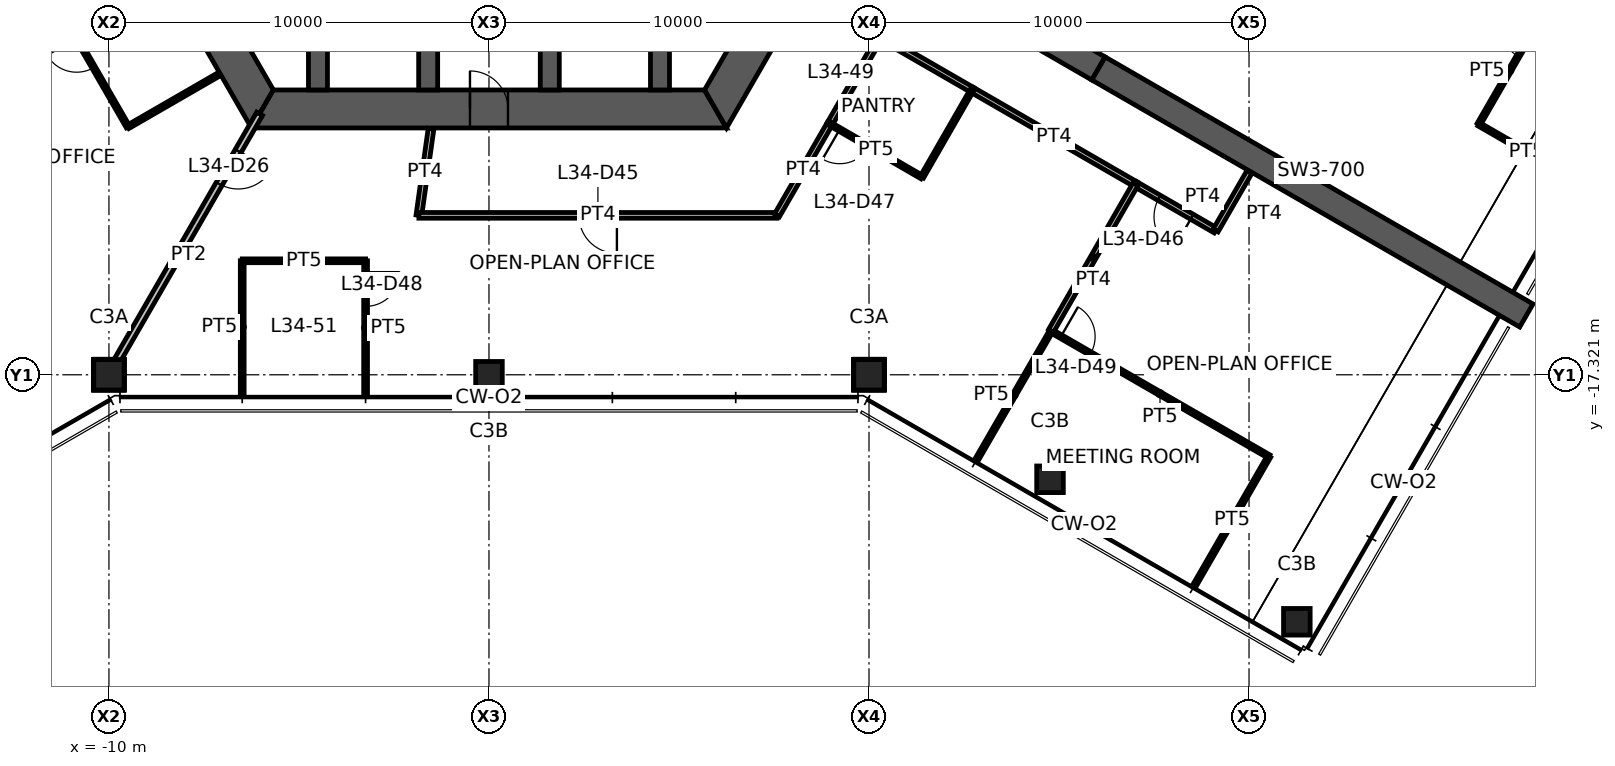
"""IFC4 building model, lengths in metres.
Left out: names, types, materials, properties, quantities, classifications, styles, units other than length and angle.
Written with IfcOpenShell. Run it as: python <this file> out.ifc"""

import sys

from ifc_helpers import new_model, si_unit, direction, frame, frame_2d, origin, origin_2d, place, context, subcontext, project, spatial, polyline, rectangle, hollow_rectangle, outline, extrude, element, fill, save


model = new_model("IFC4")
c1 = context("Model", 3, precision=1e-05, world=origin(), true_north=direction((0.0, 1.0)))
c2 = subcontext(c1, "Body", "Model", "MODEL_VIEW")
j1 = project(units=[si_unit("LENGTHUNIT", "METRE"), si_unit("PLANEANGLEUNIT", "RADIAN")], contexts=[c1])
p1 = place(None, origin())
s1 = spatial("IfcSite", under=j1, at=p1, CompositionType="ELEMENT")
p2 = place(p1, origin())
s2 = spatial("IfcBuilding", under=s1, at=p2, CompositionType="ELEMENT")
p3 = place(p2, frame((0.0, 0.0, 137.0)))
s3 = spatial("IfcBuildingStorey", under=s2, at=p3, CompositionType="ELEMENT", Elevation=137.0)
for number, where, z_axis, x_axis in (
    (1, (-10.0, -17.321, 0.0), (0.0, 0.0, 1.0), (1.0, 0.0, 0.0)),
    (2, (10.0, -17.321, 0.0), (0.0, 0.0, 1.0), (1.0, 0.0, 0.0)),
):
    element("IfcColumn", number, at=place(p3, frame(where, z_axis=z_axis, x_axis=x_axis)), inside=s3, PredefinedType="COLUMN", context=c2, shape_type="SweptSolid", body=[
        extrude(hollow_rectangle(XDim=0.8, YDim=0.8, WallThickness=0.045, at=origin_2d()), origin(), (0.0, 0.0, 1.0), 3.9),
    ])
for number, where, z_axis, x_axis in (
    (3, (0.0, -17.321, 0.0), (0.0, 0.0, 1.0), (1.0, 0.0, 0.0)),
    (4, (14.763, -20.071, 0.0), (0.0, 0.0, 1.0), (1.0, 0.0, 0.0)),
    (5, (21.258, -23.821, 0.0), (0.0, 0.0, 1.0), (1.0, 0.0, 0.0)),
):
    element("IfcColumn", number, at=place(p3, frame(where, z_axis=z_axis, x_axis=x_axis)), inside=s3, PredefinedType="COLUMN", context=c2, shape_type="SweptSolid", body=[
        extrude(hollow_rectangle(XDim=0.7, YDim=0.7, WallThickness=0.036, at=origin_2d()), origin(), (0.0, 0.0, 1.0), 3.9),
    ])
p4 = place(p3, frame((-11.922, 0.0, 0.0), z_axis=(0.0, 0.0, 1.0), x_axis=(0.500004296715, -0.866022923061, 0.0)))
e6 = element("IfcWall", 6, at=p4, inside=s3, PredefinedType="SHEAR", context=c2, shape_type="SweptSolid", body=[
    extrude(outline(polyline([(-0.289, -0.5), (6.331, -0.5), (7.131, -0.5), (12.211, -0.5), (11.634, 0.5), (7.131, 0.5), (6.331, 0.5), (0.289, 0.5), (-0.289, -0.5)])), origin(), (0.0, 0.0, 1.0), 3.9),
])
p5 = place(p4, frame((6.331, 0.0, 0.0)))
e7 = element("IfcOpeningElement", 7, at=p5, cuts=e6, PredefinedType="OPENING", context=c2, shape_type="SweptSolid", body=[
    extrude(rectangle(XDim=0.8, YDim=2.1, at=frame_2d((0.4, 1.05))), frame((0.0, 0.51, 0.0), z_axis=(0.0, -1.0, 0.0), x_axis=(1.0, 0.0, 0.0)), (0.0, 0.0, 1.0), 1.02),
])
p6 = place(p3, frame((-5.961, -10.325, 0.0), z_axis=(0.0, 0.0, 1.0), x_axis=(1.0, 0.0, 0.0)))
e8 = element("IfcWall", 8, at=p6, inside=s3, PredefinedType="SHEAR", context=c2, shape_type="SweptSolid", body=[
    extrude(outline(polyline([(-0.289, -0.5), (5.461, -0.5), (6.461, -0.5), (12.211, -0.5), (11.634, 0.5), (6.461, 0.5), (5.461, 0.5), (0.289, 0.5), (-0.289, -0.5)])), origin(), (0.0, 0.0, 1.0), 3.9),
])
p7 = place(p6, frame((5.461, 0.0, 0.0)))
e9 = element("IfcOpeningElement", 9, at=p7, cuts=e8, PredefinedType="OPENING", context=c2, shape_type="SweptSolid", body=[
    extrude(rectangle(XDim=1.0, YDim=2.1, at=frame_2d((0.5, 1.05))), frame((0.0, 0.51, 0.0), z_axis=(0.0, -1.0, 0.0), x_axis=(1.0, 0.0, 0.0)), (0.0, 0.0, 1.0), 1.02),
])
p8 = place(p3, frame((5.961, -10.325, 0.0), z_axis=(0.0, 0.0, 1.0), x_axis=(0.500004296715, 0.866022923061, 0.0)))
e10 = element("IfcWall", 10, at=p8, inside=s3, PredefinedType="SHEAR", context=c2, shape_type="SweptSolid", body=[
    extrude(outline(polyline([(-0.289, -0.5), (4.594, -0.5), (5.394, -0.5), (12.211, -0.5), (11.634, 0.5), (5.394, 0.5), (4.594, 0.5), (0.289, 0.5), (-0.289, -0.5)])), origin(), (0.0, 0.0, 1.0), 3.9),
])
p9 = place(p8, frame((4.594, 0.0, 0.0)))
e11 = element("IfcOpeningElement", 11, at=p9, cuts=e10, PredefinedType="OPENING", context=c2, shape_type="SweptSolid", body=[
    extrude(rectangle(XDim=0.8, YDim=2.1, at=frame_2d((0.4, 1.05))), frame((0.0, 0.51, 0.0), z_axis=(0.0, -1.0, 0.0), x_axis=(1.0, 0.0, 0.0)), (0.0, 0.0, 1.0), 1.02),
])
p10 = place(p3, frame((-9.375, -5.413, 0.0), z_axis=(0.0, 0.0, 1.0), x_axis=(-0.866032377459, -0.499987921047, 0.0)))
e12 = element("IfcWall", 12, at=p10, inside=s3, PredefinedType="SHEAR", context=c2, shape_type="SweptSolid", body=[
    extrude(rectangle(XDim=7.696, YDim=0.7, at=frame_2d((3.848, 0.0))), origin(), (0.0, 0.0, 1.0), 3.9),
])
p11 = place(p10, frame((0.9, 0.0, 0.0)))
e13 = element("IfcOpeningElement", 13, at=p11, cuts=e12, PredefinedType="OPENING", context=c2, shape_type="SweptSolid", body=[
    extrude(rectangle(XDim=1.0, YDim=2.1, at=frame_2d((0.5, 1.05))), frame((0.0, 0.36, 0.0), z_axis=(0.0, -1.0, 0.0), x_axis=(1.0, 0.0, 0.0)), (0.0, 0.0, 1.0), 0.72),
])
p12 = place(p3, frame((9.375, -5.413, 0.0), z_axis=(0.0, 0.0, 1.0), x_axis=(0.866032377459, -0.499987921047, 0.0)))
e14 = element("IfcWall", 14, at=p12, inside=s3, PredefinedType="SHEAR", context=c2, shape_type="SweptSolid", body=[
    extrude(rectangle(XDim=7.696, YDim=0.7, at=frame_2d((3.848, 0.0))), origin(), (0.0, 0.0, 1.0), 3.9),
])
p13 = place(p12, frame((0.9, 0.0, 0.0)))
e15 = element("IfcOpeningElement", 15, at=p13, cuts=e14, PredefinedType="OPENING", context=c2, shape_type="SweptSolid", body=[
    extrude(rectangle(XDim=1.0, YDim=2.1, at=frame_2d((0.5, 1.05))), frame((0.0, 0.36, 0.0), z_axis=(0.0, -1.0, 0.0), x_axis=(1.0, 0.0, 0.0)), (0.0, 0.0, 1.0), 0.72),
])
p14 = place(p3, frame((16.039, -9.26, 0.0), z_axis=(0.0, 0.0, 1.0), x_axis=(0.866024837091, -0.50000098154, 0.0)))
e16 = element("IfcWall", 16, at=p14, inside=s3, PredefinedType="SHEAR", context=c2, shape_type="SweptSolid", body=[
    extrude(rectangle(XDim=13.0, YDim=0.7, at=frame_2d((6.5, 0.0))), origin(), (0.0, 0.0, 1.0), 3.9),
])
p15 = place(p3, frame((-1.6, -3.85, 0.0), z_axis=(0.0, 0.0, 1.0), x_axis=(0.0, -1.0, 0.0)))
e17 = element("IfcWall", 17, at=p15, inside=s3, PredefinedType="SHEAR", context=c2, shape_type="SweptSolid", body=[
    extrude(rectangle(XDim=5.975, YDim=0.5, at=frame_2d((2.987, 0.0))), origin(), (0.0, 0.0, 1.0), 3.9),
])
p16 = place(p15, frame((3.7, 0.0, 0.0)))
e18 = element("IfcOpeningElement", 18, at=p16, cuts=e17, PredefinedType="OPENING", context=c2, shape_type="SweptSolid", body=[
    extrude(rectangle(XDim=0.9, YDim=2.1, at=frame_2d((0.45, 1.05))), frame((0.0, 0.26, 0.0), z_axis=(0.0, -1.0, 0.0), x_axis=(1.0, 0.0, 0.0)), (0.0, 0.0, 1.0), 0.52),
])
p17 = place(p3, frame((1.6, -3.85, 0.0), z_axis=(0.0, 0.0, 1.0), x_axis=(0.0, -1.0, 0.0)))
e19 = element("IfcWall", 19, at=p17, inside=s3, PredefinedType="SHEAR", context=c2, shape_type="SweptSolid", body=[
    extrude(rectangle(XDim=5.975, YDim=0.5, at=frame_2d((2.987, 0.0))), origin(), (0.0, 0.0, 1.0), 3.9),
])
p18 = place(p17, frame((3.55, 0.0, 0.0)))
e20 = element("IfcOpeningElement", 20, at=p18, cuts=e19, PredefinedType="OPENING", context=c2, shape_type="SweptSolid", body=[
    extrude(rectangle(XDim=1.2, YDim=2.1, at=frame_2d((0.6, 1.05))), frame((0.0, 0.26, 0.0), z_axis=(0.0, -1.0, 0.0), x_axis=(1.0, 0.0, 0.0)), (0.0, 0.0, 1.0), 0.52),
])
for number, where, z_axis, x_axis in (
    (21, (-4.5, -3.85, 0.0), (0.0, 0.0, 1.0), (0.0, -1.0, 0.0)),
    (22, (4.5, -3.85, 0.0), (0.0, 0.0, 1.0), (0.0, -1.0, 0.0)),
):
    element("IfcWall", number, at=place(p3, frame(where, z_axis=z_axis, x_axis=x_axis)), inside=s3, PredefinedType="SHEAR", context=c2, shape_type="SweptSolid", body=[
        extrude(rectangle(XDim=5.975, YDim=0.5, at=frame_2d((2.987, 0.0))), origin(), (0.0, 0.0, 1.0), 3.9),
    ])
p19 = place(p3, frame((-6.035, -10.453, 0.0), z_axis=(0.0, 0.0, 1.0), x_axis=(-0.499989830942, -0.866031274813, 0.0)))
e23 = element("IfcWall", 23, at=p19, inside=s3, PredefinedType="PARTITIONING", context=c2, shape_type="SweptSolid", body=[
    extrude(rectangle(XDim=7.93, YDim=0.175, at=frame_2d((3.965, 0.0))), origin(), (0.0, 0.0, 1.0), 3.05),
])
p20 = place(p19, frame((1.13, 0.0, 0.0)))
e24 = element("IfcOpeningElement", 24, at=p20, cuts=e23, PredefinedType="OPENING", context=c2, shape_type="SweptSolid", body=[
    extrude(rectangle(XDim=1.0, YDim=2.1, at=frame_2d((0.5, 1.05))), frame((0.0, 0.098, 0.0), z_axis=(0.0, -1.0, 0.0), x_axis=(1.0, 0.0, 0.0)), (0.0, 0.0, 1.0), 0.195),
])
p21 = place(p3, frame((-9.5, -10.796, 0.0), z_axis=(0.0, 0.0, 1.0), x_axis=(-0.499990139034, 0.866031096941, 0.0)))
e25 = element("IfcWall", 25, at=p21, inside=s3, PredefinedType="PARTITIONING", context=c2, shape_type="SweptSolid", body=[
    extrude(rectangle(XDim=3.0, YDim=0.1, at=frame_2d((1.5, 0.0))), origin(), (0.0, 0.0, 1.0), 2.95),
])
p22 = place(p21, frame((1.8, 0.0, 0.0)))
e26 = element("IfcOpeningElement", 26, at=p22, cuts=e25, PredefinedType="OPENING", context=c2, shape_type="SweptSolid", body=[
    extrude(rectangle(XDim=0.9, YDim=2.1, at=frame_2d((0.45, 1.05))), frame((0.0, 0.06, 0.0), z_axis=(0.0, -1.0, 0.0), x_axis=(1.0, 0.0, 0.0)), (0.0, 0.0, 1.0), 0.12),
])
p23 = place(p3, frame((-7.092, -9.406, 0.0), z_axis=(0.0, 0.0, 1.0), x_axis=(-0.86603494908, -0.499983466698, 0.0)))
e27 = element("IfcWall", 27, at=p23, inside=s3, PredefinedType="PARTITIONING", context=c2, shape_type="SweptSolid", body=[
    extrude(rectangle(XDim=2.78, YDim=0.1, at=frame_2d((1.39, 0.0))), origin(), (0.0, 0.0, 1.0), 2.95),
])
p24 = place(p3, frame((26.046, -10.727, 0.0), z_axis=(0.0, 0.0, 1.0), x_axis=(0.499765599164, 0.866160692881, 0.0)))
e28 = element("IfcWall", 28, at=p24, inside=s3, PredefinedType="PARTITIONING", context=c2, shape_type="SweptSolid", body=[
    extrude(rectangle(XDim=3.266, YDim=0.1, at=frame_2d((1.633, 0.0))), origin(), (0.0, 0.0, 1.0), 2.95),
])
p25 = place(p24, frame((2.066, 0.0, 0.0)))
e29 = element("IfcOpeningElement", 29, at=p25, cuts=e28, PredefinedType="OPENING", context=c2, shape_type="SweptSolid", body=[
    extrude(rectangle(XDim=0.9, YDim=2.1, at=frame_2d((0.45, 1.05))), frame((0.0, 0.06, 0.0), z_axis=(0.0, -1.0, 0.0), x_axis=(1.0, 0.0, 0.0)), (0.0, 0.0, 1.0), 0.12),
])
p26 = place(p3, frame((28.562, -12.18, 0.0), z_axis=(0.0, 0.0, 1.0), x_axis=(-0.866031657677, 0.499989167784, 0.0)))
e30 = element("IfcWall", 30, at=p26, inside=s3, PredefinedType="PARTITIONING", context=c2, shape_type="SweptSolid", body=[
    extrude(rectangle(XDim=2.905, YDim=0.1, at=frame_2d((1.453, 0.0))), origin(), (0.0, 0.0, 1.0), 2.95),
])
p27 = place(p3, frame((10.292, -8.425, 0.0), z_axis=(0.0, 0.0, 1.0), x_axis=(-0.499966561876, -0.866044708433, 0.0)))
e31 = element("IfcWall", 31, at=p27, inside=s3, PredefinedType="PARTITIONING", context=c2, shape_type="SweptSolid", body=[
    extrude(rectangle(XDim=2.655, YDim=0.15, at=frame_2d((1.328, 0.0))), origin(), (0.0, 0.0, 1.0), 2.95),
])
p28 = place(p3, frame((12.721, -9.827, 0.0), z_axis=(0.0, 0.0, 1.0), x_axis=(-0.866049342339, 0.499958534914, 0.0)))
e32 = element("IfcWall", 32, at=p28, inside=s3, PredefinedType="PARTITIONING", context=c2, shape_type="SweptSolid", body=[
    extrude(rectangle(XDim=2.805, YDim=0.15, at=frame_2d((1.402, 0.0))), origin(), (0.0, 0.0, 1.0), 2.95),
])
p29 = place(p3, frame((-1.844, -13.125, 0.0), z_axis=(0.0, 0.0, 1.0), x_axis=(0.139119980631, 0.990275532864, 0.0)))
e33 = element("IfcWall", 33, at=p29, inside=s3, PredefinedType="PARTITIONING", context=c2, shape_type="SweptSolid", body=[
    extrude(rectangle(XDim=2.302, YDim=0.15, at=frame_2d((1.151, 0.0))), origin(), (0.0, 0.0, 1.0), 2.95),
])
p30 = place(p3, frame((7.578, -13.125, 0.0), z_axis=(0.0, 0.0, 1.0), x_axis=(-1.0, 0.0, 0.0)))
e34 = element("IfcWall", 34, at=p30, inside=s3, PredefinedType="PARTITIONING", context=c2, shape_type="SweptSolid", body=[
    extrude(rectangle(XDim=9.422, YDim=0.15, at=frame_2d((4.711, 0.0))), origin(), (0.0, 0.0, 1.0), 2.95),
])
p31 = place(p30, frame((4.211, 0.0, 0.0)))
e35 = element("IfcOpeningElement", 35, at=p31, cuts=e34, PredefinedType="OPENING", context=c2, shape_type="SweptSolid", body=[
    extrude(rectangle(XDim=1.0, YDim=2.1, at=frame_2d((0.5, 1.05))), frame((0.0, 0.085, 0.0), z_axis=(0.0, -1.0, 0.0), x_axis=(1.0, 0.0, 0.0)), (0.0, 0.0, 1.0), 0.17),
])
p32 = place(p3, frame((8.969, -10.716, 0.0), z_axis=(0.0, 0.0, 1.0), x_axis=(-0.500008568482, -0.866020456713, 0.0)))
e36 = element("IfcWall", 36, at=p32, inside=s3, PredefinedType="PARTITIONING", context=c2, shape_type="SweptSolid", body=[
    extrude(rectangle(XDim=2.782, YDim=0.15, at=frame_2d((1.391, 0.0))), origin(), (0.0, 0.0, 1.0), 2.95),
])
p33 = place(p3, frame((17.021, -12.31, 0.0), z_axis=(0.0, 0.0, 1.0), x_axis=(-0.866018071205, 0.500012700186, 0.0)))
e37 = element("IfcWall", 37, at=p33, inside=s3, PredefinedType="PARTITIONING", context=c2, shape_type="SweptSolid", body=[
    extrude(rectangle(XDim=4.975, YDim=0.15, at=frame_2d((2.488, 0.0))), origin(), (0.0, 0.0, 1.0), 2.95),
])
p34 = place(p3, frame((19.121, -13.522, 0.0), z_axis=(0.0, 0.0, 1.0), x_axis=(-0.866000196749, 0.500043657324, 0.0)))
e38 = element("IfcWall", 38, at=p34, inside=s3, PredefinedType="PARTITIONING", context=c2, shape_type="SweptSolid", body=[
    extrude(rectangle(XDim=2.434, YDim=0.15, at=frame_2d((1.217, 0.0))), origin(), (0.0, 0.0, 1.0), 2.95),
])
p35 = place(p34, frame((0.717, 0.0, 0.0)))
e39 = element("IfcOpeningElement", 39, at=p35, cuts=e38, PredefinedType="OPENING", context=c2, shape_type="SweptSolid", body=[
    extrude(rectangle(XDim=1.0, YDim=2.1, at=frame_2d((0.5, 1.05))), frame((0.0, 0.085, 0.0), z_axis=(0.0, -1.0, 0.0), x_axis=(1.0, 0.0, 0.0)), (0.0, 0.0, 1.0), 0.17),
])
p36 = place(p3, frame((20.011, -11.981, 0.0), z_axis=(0.0, 0.0, 1.0), x_axis=(-0.500062787734, -0.865989150234, 0.0)))
e40 = element("IfcWall", 40, at=p36, inside=s3, PredefinedType="PARTITIONING", context=c2, shape_type="SweptSolid", body=[
    extrude(rectangle(XDim=1.78, YDim=0.15, at=frame_2d((0.89, 0.0))), origin(), (0.0, 0.0, 1.0), 2.95),
])
p37 = place(p3, frame((11.392, -12.119, 0.0), z_axis=(0.0, 0.0, 1.0), x_axis=(-0.865255114713, 0.501331812737, 0.0)))
e41 = element("IfcWall", 41, at=p37, inside=s3, PredefinedType="PARTITIONING", context=c2, shape_type="SweptSolid", body=[
    extrude(rectangle(XDim=2.8, YDim=0.1, at=frame_2d((1.4, 0.0))), origin(), (0.0, 0.0, 1.0), 2.95),
])
p38 = place(p37, frame((1.6, 0.0, 0.0)))
e42 = element("IfcOpeningElement", 42, at=p38, cuts=e41, PredefinedType="OPENING", context=c2, shape_type="SweptSolid", body=[
    extrude(rectangle(XDim=0.9, YDim=2.1, at=frame_2d((0.45, 1.05))), frame((0.0, 0.06, 0.0), z_axis=(0.0, -1.0, 0.0), x_axis=(1.0, 0.0, 0.0)), (0.0, 0.0, 1.0), 0.12),
])
p39 = place(p3, frame((12.713, -9.822, 0.0), z_axis=(0.0, 0.0, 1.0), x_axis=(-0.49852824611, -0.866873455488, 0.0)))
e43 = element("IfcWall", 43, at=p39, inside=s3, PredefinedType="PARTITIONING", context=c2, shape_type="SweptSolid", body=[
    extrude(rectangle(XDim=2.65, YDim=0.1, at=frame_2d((1.325, 0.0))), origin(), (0.0, 0.0, 1.0), 2.95),
])
p40 = place(p3, frame((-6.493, -17.801, 0.0), z_axis=(0.0, 0.0, 1.0), x_axis=(0.0, 1.0, 0.0)))
e44 = element("IfcWall", 44, at=p40, inside=s3, PredefinedType="PARTITIONING", context=c2, shape_type="SweptSolid", body=[
    extrude(rectangle(XDim=3.48, YDim=0.1, at=frame_2d((1.74, 0.0))), origin(), (0.0, 0.0, 1.0), 2.95),
])
p41 = place(p3, frame((-6.493, -14.321, 0.0), z_axis=(0.0, 0.0, 1.0), x_axis=(1.0, 0.0, 0.0)))
e45 = element("IfcWall", 45, at=p41, inside=s3, PredefinedType="PARTITIONING", context=c2, shape_type="SweptSolid", body=[
    extrude(rectangle(XDim=3.247, YDim=0.1, at=frame_2d((1.623, 0.0))), origin(), (0.0, 0.0, 1.0), 2.95),
])
p42 = place(p3, frame((-3.246, -14.321, 0.0), z_axis=(0.0, 0.0, 1.0), x_axis=(0.0, -1.0, 0.0)))
e46 = element("IfcWall", 46, at=p42, inside=s3, PredefinedType="PARTITIONING", context=c2, shape_type="SweptSolid", body=[
    extrude(rectangle(XDim=3.53, YDim=0.1, at=frame_2d((1.765, 0.0))), origin(), (0.0, 0.0, 1.0), 2.95),
])
p43 = place(p42, frame((0.3, 0.0, 0.0)))
e47 = element("IfcOpeningElement", 47, at=p43, cuts=e46, PredefinedType="OPENING", context=c2, shape_type="SweptSolid", body=[
    extrude(rectangle(XDim=0.9, YDim=2.1, at=frame_2d((0.45, 1.05))), frame((0.0, 0.06, 0.0), z_axis=(0.0, -1.0, 0.0), x_axis=(1.0, 0.0, 0.0)), (0.0, 0.0, 1.0), 0.12),
])
p44 = place(p3, frame((12.84, -19.543, 0.0), z_axis=(0.0, 0.0, 1.0), x_axis=(0.501092951989, 0.865393467428, 0.0)))
e48 = element("IfcWall", 48, at=p44, inside=s3, PredefinedType="PARTITIONING", context=c2, shape_type="SweptSolid", body=[
    extrude(rectangle(XDim=3.905, YDim=0.1, at=frame_2d((1.953, 0.0))), origin(), (0.0, 0.0, 1.0), 2.95),
])
p45 = place(p3, frame((14.79, -16.165, 0.0), z_axis=(0.0, 0.0, 1.0), x_axis=(0.866359914703, -0.499420161984, 0.0)))
e49 = element("IfcWall", 49, at=p45, inside=s3, PredefinedType="PARTITIONING", context=c2, shape_type="SweptSolid", body=[
    extrude(rectangle(XDim=6.619, YDim=0.1, at=frame_2d((3.31, 0.0))), origin(), (0.0, 0.0, 1.0), 2.95),
])
p46 = place(p45, frame((0.3, 0.0, 0.0)))
e50 = element("IfcOpeningElement", 50, at=p46, cuts=e49, PredefinedType="OPENING", context=c2, shape_type="SweptSolid", body=[
    extrude(rectangle(XDim=0.9, YDim=2.1, at=frame_2d((0.45, 1.05))), frame((0.0, 0.06, 0.0), z_axis=(0.0, -1.0, 0.0), x_axis=(1.0, 0.0, 0.0)), (0.0, 0.0, 1.0), 0.12),
])
p47 = place(p3, frame((20.525, -19.471, 0.0), z_axis=(0.0, 0.0, 1.0), x_axis=(-0.499996613652, -0.866027358884, 0.0)))
e51 = element("IfcWall", 51, at=p47, inside=s3, PredefinedType="PARTITIONING", context=c2, shape_type="SweptSolid", body=[
    extrude(rectangle(XDim=3.88, YDim=0.1, at=frame_2d((1.94, 0.0))), origin(), (0.0, 0.0, 1.0), 2.95),
])
p48 = place(p3, frame((17.013, -12.305, 0.0), z_axis=(0.0, 0.0, 1.0), x_axis=(-0.499081704511, -0.866554933182, 0.0)))
e52 = element("IfcWall", 52, at=p48, inside=s3, PredefinedType="PARTITIONING", context=c2, shape_type="SweptSolid", body=[
    extrude(rectangle(XDim=4.454, YDim=0.15, at=frame_2d((2.227, 0.0))), origin(), (0.0, 0.0, 1.0), 2.95),
])
p49 = place(p7, origin())
e53 = element("IfcDoor", 53, at=p49, inside=s3, OperationType="SINGLE_SWING_LEFT", PredefinedType="DOOR", context=c2, shape_type="SweptSolid", body=[
    extrude(rectangle(XDim=1.0, YDim=2.1, at=frame_2d((0.5, 1.05))), frame((0.0, 0.025, 0.0), z_axis=(0.0, -1.0, 0.0), x_axis=(1.0, 0.0, 0.0)), (0.0, 0.0, 1.0), 0.05),
])
fill(e9, e53)
p50 = place(p20, origin())
e54 = element("IfcDoor", 54, at=p50, inside=s3, OperationType="SINGLE_SWING_LEFT", PredefinedType="DOOR", context=c2, shape_type="SweptSolid", body=[
    extrude(rectangle(XDim=1.0, YDim=2.1, at=frame_2d((0.5, 1.05))), frame((0.0, 0.025, 0.0), z_axis=(0.0, -1.0, 0.0), x_axis=(1.0, 0.0, 0.0)), (0.0, 0.0, 1.0), 0.05),
])
fill(e24, e54)
p51 = place(p22, origin())
e55 = element("IfcDoor", 55, at=p51, inside=s3, OperationType="SINGLE_SWING_RIGHT", PredefinedType="DOOR", context=c2, shape_type="SweptSolid", body=[
    extrude(rectangle(XDim=0.9, YDim=2.1, at=frame_2d((0.45, 1.05))), frame((0.0, 0.025, 0.0), z_axis=(0.0, -1.0, 0.0), x_axis=(1.0, 0.0, 0.0)), (0.0, 0.0, 1.0), 0.05),
])
fill(e26, e55)
p52 = place(p25, origin())
e56 = element("IfcDoor", 56, at=p52, inside=s3, OperationType="SINGLE_SWING_RIGHT", PredefinedType="DOOR", context=c2, shape_type="SweptSolid", body=[
    extrude(rectangle(XDim=0.9, YDim=2.1, at=frame_2d((0.45, 1.05))), frame((0.0, 0.025, 0.0), z_axis=(0.0, -1.0, 0.0), x_axis=(1.0, 0.0, 0.0)), (0.0, 0.0, 1.0), 0.05),
])
fill(e29, e56)
p53 = place(p31, origin())
e57 = element("IfcDoor", 57, at=p53, inside=s3, OperationType="SINGLE_SWING_LEFT", PredefinedType="DOOR", context=c2, shape_type="SweptSolid", body=[
    extrude(rectangle(XDim=1.0, YDim=2.1, at=frame_2d((0.5, 1.05))), frame((0.0, 0.025, 0.0), z_axis=(0.0, -1.0, 0.0), x_axis=(1.0, 0.0, 0.0)), (0.0, 0.0, 1.0), 0.05),
])
fill(e35, e57)
p54 = place(p35, origin())
e58 = element("IfcDoor", 58, at=p54, inside=s3, OperationType="SINGLE_SWING_LEFT", PredefinedType="DOOR", context=c2, shape_type="SweptSolid", body=[
    extrude(rectangle(XDim=1.0, YDim=2.1, at=frame_2d((0.5, 1.05))), frame((0.0, 0.025, 0.0), z_axis=(0.0, -1.0, 0.0), x_axis=(1.0, 0.0, 0.0)), (0.0, 0.0, 1.0), 0.05),
])
fill(e39, e58)
p55 = place(p38, origin())
e59 = element("IfcDoor", 59, at=p55, inside=s3, OperationType="SINGLE_SWING_RIGHT", PredefinedType="DOOR", context=c2, shape_type="SweptSolid", body=[
    extrude(rectangle(XDim=0.9, YDim=2.1, at=frame_2d((0.45, 1.05))), frame((0.0, 0.025, 0.0), z_axis=(0.0, -1.0, 0.0), x_axis=(1.0, 0.0, 0.0)), (0.0, 0.0, 1.0), 0.05),
])
fill(e42, e59)
p56 = place(p43, origin())
e60 = element("IfcDoor", 60, at=p56, inside=s3, OperationType="SINGLE_SWING_LEFT", PredefinedType="DOOR", context=c2, shape_type="SweptSolid", body=[
    extrude(rectangle(XDim=0.9, YDim=2.1, at=frame_2d((0.45, 1.05))), frame((0.0, 0.025, 0.0), z_axis=(0.0, -1.0, 0.0), x_axis=(1.0, 0.0, 0.0)), (0.0, 0.0, 1.0), 0.05),
])
fill(e47, e60)
p57 = place(p46, origin())
e61 = element("IfcDoor", 61, at=p57, inside=s3, OperationType="SINGLE_SWING_LEFT", PredefinedType="DOOR", context=c2, shape_type="SweptSolid", body=[
    extrude(rectangle(XDim=0.9, YDim=2.1, at=frame_2d((0.45, 1.05))), frame((0.0, 0.025, 0.0), z_axis=(0.0, -1.0, 0.0), x_axis=(1.0, 0.0, 0.0)), (0.0, 0.0, 1.0), 0.05),
])
fill(e50, e61)
save(model, sys.argv[1])
